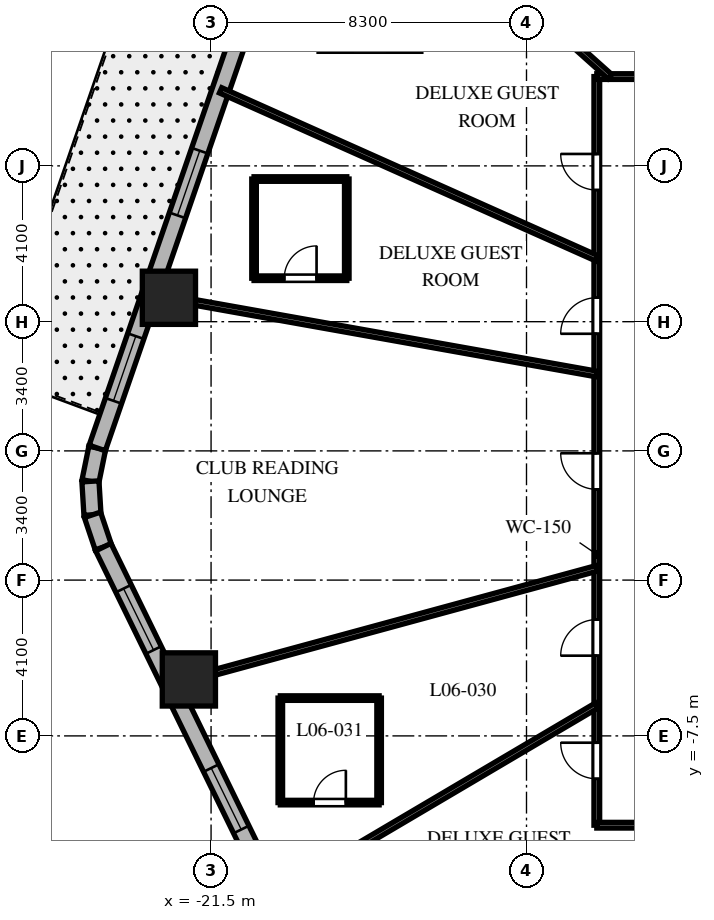
"""IFC4 building model, lengths in metres.
Left out: names, types, materials, properties, quantities, classifications, styles, units other than length and angle.
Written with IfcOpenShell. Run it as: python <this file> out.ifc"""

import sys

from ifc_helpers import new_model, si_unit, direction, frame, frame_2d, origin, origin_2d, place, context, subcontext, project, spatial, rectangle, extrude, element, fill, save


model = new_model("IFC4")
c1 = context("Model", 3, precision=1e-05, world=origin(), true_north=direction((0.0, 1.0)))
c2 = subcontext(c1, "Body", "Model", "MODEL_VIEW")
j1 = project(units=[si_unit("LENGTHUNIT", "METRE"), si_unit("PLANEANGLEUNIT", "RADIAN")], contexts=[c1])
p1 = place(None, origin())
s1 = spatial("IfcSite", under=j1, at=p1, CompositionType="ELEMENT")
p2 = place(p1, origin())
s2 = spatial("IfcBuilding", under=s1, at=p2, CompositionType="ELEMENT")
p3 = place(p2, frame((0.0, 0.0, 34.2)))
s3 = spatial("IfcBuildingStorey", under=s2, at=p3, CompositionType="ELEMENT", Elevation=34.2)
for number, where, z_axis, x_axis in (
    (1, (-22.609, 4.029, 0.0), (0.0, 0.0, 1.0), (1.0, 0.0, 0.0)),
    (2, (-22.084, -6.014, 0.0), (0.0, 0.0, 1.0), (1.0, 0.0, 0.0)),
):
    element("IfcColumn", number, at=place(p3, frame(where, z_axis=z_axis, x_axis=x_axis)), inside=s3, PredefinedType="COLUMN", context=c2, shape_type="SweptSolid", body=[
        extrude(rectangle(XDim=1.4, YDim=1.4, at=origin_2d()), origin(), (0.0, 0.0, 1.0), 3.7),
    ])
p4 = place(p3, frame((-24.496, 0.077, 0.0), z_axis=(0.0, 0.0, 1.0), x_axis=(-0.199570594521, -0.979883451132, 0.0)))
e3 = element("IfcWall", 3, at=p4, inside=s3, PredefinedType="SOLIDWALL", context=c2, shape_type="SweptSolid", body=[
    extrude(rectangle(XDim=0.897, YDim=0.45, at=frame_2d((0.448, 0.0))), origin(), (0.0, 0.0, 1.0), 3.4),
])
p5 = place(p3, frame((-24.675, -0.802, 0.0), z_axis=(0.0, 0.0, 1.0), x_axis=(0.061188874166, -0.998126205286, 0.0)))
e4 = element("IfcWall", 4, at=p5, inside=s3, PredefinedType="SOLIDWALL", context=c2, shape_type="SweptSolid", body=[
    extrude(rectangle(XDim=0.882, YDim=0.45, at=frame_2d((0.441, 0.0))), origin(), (0.0, 0.0, 1.0), 3.4),
])
p6 = place(p3, frame((-24.621, -1.682, 0.0), z_axis=(0.0, 0.0, 1.0), x_axis=(0.317697451681, -0.948192137278, 0.0)))
e5 = element("IfcWall", 5, at=p6, inside=s3, PredefinedType="SOLIDWALL", context=c2, shape_type="SweptSolid", body=[
    extrude(rectangle(XDim=0.897, YDim=0.45, at=frame_2d((0.448, 0.0))), origin(), (0.0, 0.0, 1.0), 3.4),
])
p7 = place(p3, frame((-17.39, 20.678, 0.0), z_axis=(0.0, 0.0, 1.0), x_axis=(-0.326068018294, -0.945346310854, 0.0)))
e6 = element("IfcWall", 6, at=p7, inside=s3, PredefinedType="SOLIDWALL", context=c2, shape_type="SweptSolid", body=[
    extrude(rectangle(XDim=21.793, YDim=0.45, at=frame_2d((10.896, 0.0))), origin(), (0.0, 0.0, 1.0), 3.4),
])
p8 = place(p7, frame((5.493, 0.0, 0.0)))
e7 = element("IfcOpeningElement", 7, at=p8, cuts=e6, PredefinedType="OPENING", context=c2, shape_type="SweptSolid", body=[
    extrude(rectangle(XDim=1.0, YDim=2.15, at=frame_2d((0.5, 1.075))), frame((0.0, 0.235, 0.0), z_axis=(0.0, -1.0, 0.0), x_axis=(1.0, 0.0, 0.0)), (0.0, 0.0, 1.0), 0.47),
])
p9 = place(p7, frame((1.26, 0.0, 0.8)))
e8 = element("IfcOpeningElement", 8, at=p9, cuts=e6, PredefinedType="OPENING", context=c2, shape_type="SweptSolid", body=[
    extrude(rectangle(XDim=1.8, YDim=1.8, at=frame_2d((0.9, 0.9))), frame((0.0, 0.235, 0.0), z_axis=(0.0, -1.0, 0.0), x_axis=(1.0, 0.0, 0.0)), (0.0, 0.0, 1.0), 0.47),
])
p10 = place(p7, frame((7.363, 0.0, 0.8)))
e9 = element("IfcOpeningElement", 9, at=p10, cuts=e6, PredefinedType="OPENING", context=c2, shape_type="SweptSolid", body=[
    extrude(rectangle(XDim=1.8, YDim=1.8, at=frame_2d((0.9, 0.9))), frame((0.0, 0.235, 0.0), z_axis=(0.0, -1.0, 0.0), x_axis=(1.0, 0.0, 0.0)), (0.0, 0.0, 1.0), 0.47),
])
p11 = place(p7, frame((13.518, 0.0, 0.8)))
e10 = element("IfcOpeningElement", 10, at=p11, cuts=e6, PredefinedType="OPENING", context=c2, shape_type="SweptSolid", body=[
    extrude(rectangle(XDim=1.8, YDim=1.8, at=frame_2d((0.9, 0.9))), frame((0.0, 0.235, 0.0), z_axis=(0.0, -1.0, 0.0), x_axis=(1.0, 0.0, 0.0)), (0.0, 0.0, 1.0), 0.47),
])
p12 = place(p7, frame((18.68, 0.0, 0.8)))
e11 = element("IfcOpeningElement", 11, at=p12, cuts=e6, PredefinedType="OPENING", context=c2, shape_type="SweptSolid", body=[
    extrude(rectangle(XDim=1.8, YDim=1.8, at=frame_2d((0.9, 0.9))), frame((0.0, 0.235, 0.0), z_axis=(0.0, -1.0, 0.0), x_axis=(1.0, 0.0, 0.0)), (0.0, 0.0, 1.0), 0.47),
])
p13 = place(p3, frame((-24.336, -2.532, 0.0), z_axis=(0.0, 0.0, 1.0), x_axis=(0.438931326393, -0.898520612291, 0.0)))
e12 = element("IfcWall", 12, at=p13, inside=s3, PredefinedType="SOLIDWALL", context=c2, shape_type="SweptSolid", body=[
    extrude(rectangle(XDim=20.623, YDim=0.45, at=frame_2d((10.312, 0.0))), origin(), (0.0, 0.0, 1.0), 3.4),
])
p14 = place(p13, frame((1.214, 0.0, 0.8)))
e13 = element("IfcOpeningElement", 13, at=p14, cuts=e12, PredefinedType="OPENING", context=c2, shape_type="SweptSolid", body=[
    extrude(rectangle(XDim=1.8, YDim=1.8, at=frame_2d((0.9, 0.9))), frame((0.0, 0.235, 0.0), z_axis=(0.0, -1.0, 0.0), x_axis=(1.0, 0.0, 0.0)), (0.0, 0.0, 1.0), 0.47),
])
p15 = place(p13, frame((6.47, 0.0, 0.8)))
e14 = element("IfcOpeningElement", 14, at=p15, cuts=e12, PredefinedType="OPENING", context=c2, shape_type="SweptSolid", body=[
    extrude(rectangle(XDim=1.8, YDim=1.8, at=frame_2d((0.9, 0.9))), frame((0.0, 0.235, 0.0), z_axis=(0.0, -1.0, 0.0), x_axis=(1.0, 0.0, 0.0)), (0.0, 0.0, 1.0), 0.47),
])
p16 = place(p13, frame((12.311, 0.0, 0.8)))
e15 = element("IfcOpeningElement", 15, at=p16, cuts=e12, PredefinedType="OPENING", context=c2, shape_type="SweptSolid", body=[
    extrude(rectangle(XDim=1.8, YDim=1.8, at=frame_2d((0.9, 0.9))), frame((0.0, 0.235, 0.0), z_axis=(0.0, -1.0, 0.0), x_axis=(1.0, 0.0, 0.0)), (0.0, 0.0, 1.0), 0.47),
])
p17 = place(p13, frame((17.66, 0.0, 0.8)))
e16 = element("IfcOpeningElement", 16, at=p17, cuts=e12, PredefinedType="OPENING", context=c2, shape_type="SweptSolid", body=[
    extrude(rectangle(XDim=1.8, YDim=1.8, at=frame_2d((0.9, 0.9))), frame((0.0, 0.235, 0.0), z_axis=(0.0, -1.0, 0.0), x_axis=(1.0, 0.0, 0.0)), (0.0, 0.0, 1.0), 0.47),
])
p18 = place(p3, frame((-11.35, -9.85, 0.0), z_axis=(0.0, 0.0, 1.0), x_axis=(0.0, 1.0, 0.0)))
e17 = element("IfcWall", 17, at=p18, inside=s3, PredefinedType="PARTITIONING", context=c2, shape_type="SweptSolid", body=[
    extrude(rectangle(XDim=19.7, YDim=0.15, at=frame_2d((9.85, 0.0))), origin(), (0.0, 0.0, 1.0), 2.84),
])
p19 = place(p18, frame((16.714, 0.0, 0.0)))
e18 = element("IfcOpeningElement", 18, at=p19, cuts=e17, PredefinedType="OPENING", context=c2, shape_type="SweptSolid", body=[
    extrude(rectangle(XDim=0.95, YDim=2.03, at=frame_2d((0.475, 1.015))), frame((0.0, 0.085, 0.0), z_axis=(0.0, -1.0, 0.0), x_axis=(1.0, 0.0, 0.0)), (0.0, 0.0, 1.0), 0.17),
])
p20 = place(p18, frame((12.932, 0.0, 0.0)))
e19 = element("IfcOpeningElement", 19, at=p20, cuts=e17, PredefinedType="OPENING", context=c2, shape_type="SweptSolid", body=[
    extrude(rectangle(XDim=0.95, YDim=2.03, at=frame_2d((0.475, 1.015))), frame((0.0, 0.085, 0.0), z_axis=(0.0, -1.0, 0.0), x_axis=(1.0, 0.0, 0.0)), (0.0, 0.0, 1.0), 0.17),
])
p21 = place(p18, frame((8.838, 0.0, 0.0)))
e20 = element("IfcOpeningElement", 20, at=p21, cuts=e17, PredefinedType="OPENING", context=c2, shape_type="SweptSolid", body=[
    extrude(rectangle(XDim=0.95, YDim=2.03, at=frame_2d((0.475, 1.015))), frame((0.0, 0.085, 0.0), z_axis=(0.0, -1.0, 0.0), x_axis=(1.0, 0.0, 0.0)), (0.0, 0.0, 1.0), 0.17),
])
p22 = place(p18, frame((4.461, 0.0, 0.0)))
e21 = element("IfcOpeningElement", 21, at=p22, cuts=e17, PredefinedType="OPENING", context=c2, shape_type="SweptSolid", body=[
    extrude(rectangle(XDim=0.95, YDim=2.03, at=frame_2d((0.475, 1.015))), frame((0.0, 0.085, 0.0), z_axis=(0.0, -1.0, 0.0), x_axis=(1.0, 0.0, 0.0)), (0.0, 0.0, 1.0), 0.17),
])
p23 = place(p18, frame((1.221, 0.0, 0.0)))
e22 = element("IfcOpeningElement", 22, at=p23, cuts=e17, PredefinedType="OPENING", context=c2, shape_type="SweptSolid", body=[
    extrude(rectangle(XDim=0.95, YDim=2.03, at=frame_2d((0.475, 1.015))), frame((0.0, 0.085, 0.0), z_axis=(0.0, -1.0, 0.0), x_axis=(1.0, 0.0, 0.0)), (0.0, 0.0, 1.0), 0.17),
])
p24 = place(p3, frame((-11.35, 9.85, 0.0), z_axis=(0.0, 0.0, 1.0), x_axis=(1.0, 0.0, 0.0)))
e23 = element("IfcWall", 23, at=p24, inside=s3, PredefinedType="PARTITIONING", context=c2, shape_type="SweptSolid", body=[
    extrude(rectangle(XDim=22.7, YDim=0.15, at=frame_2d((11.35, 0.0))), origin(), (0.0, 0.0, 1.0), 2.84),
])
p25 = place(p24, frame((18.436, 0.0, 0.0)))
e24 = element("IfcOpeningElement", 24, at=p25, cuts=e23, PredefinedType="OPENING", context=c2, shape_type="SweptSolid", body=[
    extrude(rectangle(XDim=0.95, YDim=2.03, at=frame_2d((0.475, 1.015))), frame((0.0, 0.085, 0.0), z_axis=(0.0, -1.0, 0.0), x_axis=(1.0, 0.0, 0.0)), (0.0, 0.0, 1.0), 0.17),
])
p26 = place(p24, frame((15.176, 0.0, 0.0)))
e25 = element("IfcOpeningElement", 25, at=p26, cuts=e23, PredefinedType="OPENING", context=c2, shape_type="SweptSolid", body=[
    extrude(rectangle(XDim=0.9, YDim=2.03, at=frame_2d((0.45, 1.015))), frame((0.0, 0.085, 0.0), z_axis=(0.0, -1.0, 0.0), x_axis=(1.0, 0.0, 0.0)), (0.0, 0.0, 1.0), 0.17),
])
p27 = place(p24, frame((12.415, 0.0, 0.0)))
e26 = element("IfcOpeningElement", 26, at=p27, cuts=e23, PredefinedType="OPENING", context=c2, shape_type="SweptSolid", body=[
    extrude(rectangle(XDim=0.95, YDim=2.03, at=frame_2d((0.475, 1.015))), frame((0.0, 0.085, 0.0), z_axis=(0.0, -1.0, 0.0), x_axis=(1.0, 0.0, 0.0)), (0.0, 0.0, 1.0), 0.17),
])
p28 = place(p24, frame((8.925, 0.0, 0.0)))
e27 = element("IfcOpeningElement", 27, at=p28, cuts=e23, PredefinedType="OPENING", context=c2, shape_type="SweptSolid", body=[
    extrude(rectangle(XDim=0.95, YDim=2.03, at=frame_2d((0.475, 1.015))), frame((0.0, 0.085, 0.0), z_axis=(0.0, -1.0, 0.0), x_axis=(1.0, 0.0, 0.0)), (0.0, 0.0, 1.0), 0.17),
])
p29 = place(p24, frame((3.369, 0.0, 0.0)))
e28 = element("IfcOpeningElement", 28, at=p29, cuts=e23, PredefinedType="OPENING", context=c2, shape_type="SweptSolid", body=[
    extrude(rectangle(XDim=0.95, YDim=2.03, at=frame_2d((0.475, 1.015))), frame((0.0, 0.085, 0.0), z_axis=(0.0, -1.0, 0.0), x_axis=(1.0, 0.0, 0.0)), (0.0, 0.0, 1.0), 0.17),
])
p30 = place(p3, frame((11.35, -9.85, 0.0), z_axis=(0.0, 0.0, 1.0), x_axis=(-1.0, 0.0, 0.0)))
e29 = element("IfcWall", 29, at=p30, inside=s3, PredefinedType="PARTITIONING", context=c2, shape_type="SweptSolid", body=[
    extrude(rectangle(XDim=22.7, YDim=0.15, at=frame_2d((11.35, 0.0))), origin(), (0.0, 0.0, 1.0), 2.84),
])
p31 = place(p30, frame((18.436, 0.0, 0.0)))
e30 = element("IfcOpeningElement", 30, at=p31, cuts=e29, PredefinedType="OPENING", context=c2, shape_type="SweptSolid", body=[
    extrude(rectangle(XDim=0.95, YDim=2.03, at=frame_2d((0.475, 1.015))), frame((0.0, 0.085, 0.0), z_axis=(0.0, -1.0, 0.0), x_axis=(1.0, 0.0, 0.0)), (0.0, 0.0, 1.0), 0.17),
])
p32 = place(p30, frame((15.176, 0.0, 0.0)))
e31 = element("IfcOpeningElement", 31, at=p32, cuts=e29, PredefinedType="OPENING", context=c2, shape_type="SweptSolid", body=[
    extrude(rectangle(XDim=0.9, YDim=2.03, at=frame_2d((0.45, 1.015))), frame((0.0, 0.085, 0.0), z_axis=(0.0, -1.0, 0.0), x_axis=(1.0, 0.0, 0.0)), (0.0, 0.0, 1.0), 0.17),
])
p33 = place(p30, frame((12.415, 0.0, 0.0)))
e32 = element("IfcOpeningElement", 32, at=p33, cuts=e29, PredefinedType="OPENING", context=c2, shape_type="SweptSolid", body=[
    extrude(rectangle(XDim=0.95, YDim=2.03, at=frame_2d((0.475, 1.015))), frame((0.0, 0.085, 0.0), z_axis=(0.0, -1.0, 0.0), x_axis=(1.0, 0.0, 0.0)), (0.0, 0.0, 1.0), 0.17),
])
p34 = place(p30, frame((8.925, 0.0, 0.0)))
e33 = element("IfcOpeningElement", 33, at=p34, cuts=e29, PredefinedType="OPENING", context=c2, shape_type="SweptSolid", body=[
    extrude(rectangle(XDim=0.95, YDim=2.03, at=frame_2d((0.475, 1.015))), frame((0.0, 0.085, 0.0), z_axis=(0.0, -1.0, 0.0), x_axis=(1.0, 0.0, 0.0)), (0.0, 0.0, 1.0), 0.17),
])
p35 = place(p30, frame((5.463, 0.0, 0.0)))
e34 = element("IfcOpeningElement", 34, at=p35, cuts=e29, PredefinedType="OPENING", context=c2, shape_type="SweptSolid", body=[
    extrude(rectangle(XDim=0.95, YDim=2.03, at=frame_2d((0.475, 1.015))), frame((0.0, 0.085, 0.0), z_axis=(0.0, -1.0, 0.0), x_axis=(1.0, 0.0, 0.0)), (0.0, 0.0, 1.0), 0.17),
])
p36 = place(p30, frame((1.91, 0.0, 0.0)))
e35 = element("IfcOpeningElement", 35, at=p36, cuts=e29, PredefinedType="OPENING", context=c2, shape_type="SweptSolid", body=[
    extrude(rectangle(XDim=0.9, YDim=2.03, at=frame_2d((0.45, 1.015))), frame((0.0, 0.085, 0.0), z_axis=(0.0, -1.0, 0.0), x_axis=(1.0, 0.0, 0.0)), (0.0, 0.0, 1.0), 0.17),
])
p37 = place(p3, frame((-11.007, 9.85, 0.0), z_axis=(0.0, 0.0, 1.0), x_axis=(-0.745177305978, 0.666866390407, 0.0)))
e36 = element("IfcWall", 36, at=p37, inside=s3, PredefinedType="PARTITIONING", context=c2, shape_type="SweptSolid", body=[
    extrude(rectangle(XDim=10.375, YDim=0.15, at=frame_2d((5.188, 0.0))), origin(), (0.0, 0.0, 1.0), 2.54),
])
p38 = place(p3, frame((-11.35, 5.068, 0.0), z_axis=(0.0, 0.0, 1.0), x_axis=(-0.913107192911, 0.407719577963, 0.0)))
e37 = element("IfcWall", 37, at=p38, inside=s3, PredefinedType="PARTITIONING", context=c2, shape_type="SweptSolid", body=[
    extrude(rectangle(XDim=10.841, YDim=0.15, at=frame_2d((5.421, 0.0))), origin(), (0.0, 0.0, 1.0), 2.54),
])
p39 = place(p3, frame((-11.35, 2.023, 0.0), z_axis=(0.0, 0.0, 1.0), x_axis=(-0.984493741877, 0.17541970301, 0.0)))
e38 = element("IfcWall", 38, at=p39, inside=s3, PredefinedType="PARTITIONING", context=c2, shape_type="SweptSolid", body=[
    extrude(rectangle(XDim=11.937, YDim=0.15, at=frame_2d((5.969, 0.0))), origin(), (0.0, 0.0, 1.0), 2.54),
])
p40 = place(p3, frame((-11.35, -3.091, 0.0), z_axis=(0.0, 0.0, 1.0), x_axis=(-0.964859685283, -0.262765651704, 0.0)))
e39 = element("IfcWall", 39, at=p40, inside=s3, PredefinedType="PARTITIONING", context=c2, shape_type="SweptSolid", body=[
    extrude(rectangle(XDim=11.629, YDim=0.15, at=frame_2d((5.814, 0.0))), origin(), (0.0, 0.0, 1.0), 2.54),
])
p41 = place(p3, frame((-11.35, -6.698, 0.0), z_axis=(0.0, 0.0, 1.0), x_axis=(-0.861198232886, -0.508269223614, 0.0)))
e40 = element("IfcWall", 40, at=p41, inside=s3, PredefinedType="PARTITIONING", context=c2, shape_type="SweptSolid", body=[
    extrude(rectangle(XDim=9.87, YDim=0.15, at=frame_2d((4.935, 0.0))), origin(), (0.0, 0.0, 1.0), 2.54),
])
p42 = place(p3, frame((-9.558, -9.85, 0.0), z_axis=(0.0, 0.0, 1.0), x_axis=(-0.69638346089, -0.717669893056, 0.0)))
e41 = element("IfcWall", 41, at=p42, inside=s3, PredefinedType="PARTITIONING", context=c2, shape_type="SweptSolid", body=[
    extrude(rectangle(XDim=10.701, YDim=0.15, at=frame_2d((5.351, 0.0))), origin(), (0.0, 0.0, 1.0), 2.54),
])
p43 = place(p3, frame((-5.471, -9.85, 0.0), z_axis=(0.0, 0.0, 1.0), x_axis=(-0.48553323157, -0.874218211341, 0.0)))
e42 = element("IfcWall", 42, at=p43, inside=s3, PredefinedType="PARTITIONING", context=c2, shape_type="SweptSolid", body=[
    extrude(rectangle(XDim=14.74, YDim=0.15, at=frame_2d((7.37, 0.0))), origin(), (0.0, 0.0, 1.0), 2.54),
])
p44 = place(p3, frame((-20.369, 4.544, 0.0), z_axis=(0.0, 0.0, 1.0), x_axis=(1.0, 0.0, 0.0)))
e43 = element("IfcWall", 43, at=p44, inside=s3, PredefinedType="PARTITIONING", context=c2, shape_type="SweptSolid", body=[
    extrude(rectangle(XDim=2.44, YDim=0.12, at=frame_2d((1.22, 0.0))), origin(), (0.0, 0.0, 1.0), 2.84),
])
p45 = place(p44, frame((0.795, 0.0, 0.0)))
e44 = element("IfcOpeningElement", 44, at=p45, cuts=e43, PredefinedType="OPENING", context=c2, shape_type="SweptSolid", body=[
    extrude(rectangle(XDim=0.85, YDim=2.03, at=frame_2d((0.425, 1.015))), frame((0.0, 0.07, 0.0), z_axis=(0.0, -1.0, 0.0), x_axis=(1.0, 0.0, 0.0)), (0.0, 0.0, 1.0), 0.14),
])
p46 = place(p3, frame((-17.929, 4.544, 0.0), z_axis=(0.0, 0.0, 1.0), x_axis=(0.0, 1.0, 0.0)))
e45 = element("IfcWall", 45, at=p46, inside=s3, PredefinedType="PARTITIONING", context=c2, shape_type="SweptSolid", body=[
    extrude(rectangle(XDim=2.61, YDim=0.12, at=frame_2d((1.305, 0.0))), origin(), (0.0, 0.0, 1.0), 2.84),
])
p47 = place(p3, frame((-17.929, 7.154, 0.0), z_axis=(0.0, 0.0, 1.0), x_axis=(-1.0, 0.0, 0.0)))
e46 = element("IfcWall", 46, at=p47, inside=s3, PredefinedType="PARTITIONING", context=c2, shape_type="SweptSolid", body=[
    extrude(rectangle(XDim=2.44, YDim=0.12, at=frame_2d((1.22, 0.0))), origin(), (0.0, 0.0, 1.0), 3.4),
])
p48 = place(p3, frame((-20.369, 7.154, 0.0), z_axis=(0.0, 0.0, 1.0), x_axis=(0.0, -1.0, 0.0)))
e47 = element("IfcWall", 47, at=p48, inside=s3, PredefinedType="PARTITIONING", context=c2, shape_type="SweptSolid", body=[
    extrude(rectangle(XDim=2.61, YDim=0.12, at=frame_2d((1.305, 0.0))), origin(), (0.0, 0.0, 1.0), 2.84),
])
p49 = place(p3, frame((-19.678, -9.255, 0.0), z_axis=(0.0, 0.0, 1.0), x_axis=(1.0, 0.0, 0.0)))
e48 = element("IfcWall", 48, at=p49, inside=s3, PredefinedType="PARTITIONING", context=c2, shape_type="SweptSolid", body=[
    extrude(rectangle(XDim=2.6, YDim=0.12, at=frame_2d((1.3, 0.0))), origin(), (0.0, 0.0, 1.0), 3.4),
])
p50 = place(p49, frame((0.875, 0.0, 0.0)))
e49 = element("IfcOpeningElement", 49, at=p50, cuts=e48, PredefinedType="OPENING", context=c2, shape_type="SweptSolid", body=[
    extrude(rectangle(XDim=0.85, YDim=2.03, at=frame_2d((0.425, 1.015))), frame((0.0, 0.07, 0.0), z_axis=(0.0, -1.0, 0.0), x_axis=(1.0, 0.0, 0.0)), (0.0, 0.0, 1.0), 0.14),
])
p51 = place(p3, frame((-17.078, -9.255, 0.0), z_axis=(0.0, 0.0, 1.0), x_axis=(0.0, 1.0, 0.0)))
e50 = element("IfcWall", 50, at=p51, inside=s3, PredefinedType="PARTITIONING", context=c2, shape_type="SweptSolid", body=[
    extrude(rectangle(XDim=2.75, YDim=0.12, at=frame_2d((1.375, 0.0))), origin(), (0.0, 0.0, 1.0), 2.84),
])
p52 = place(p3, frame((-17.078, -6.505, 0.0), z_axis=(0.0, 0.0, 1.0), x_axis=(-1.0, 0.0, 0.0)))
e51 = element("IfcWall", 51, at=p52, inside=s3, PredefinedType="PARTITIONING", context=c2, shape_type="SweptSolid", body=[
    extrude(rectangle(XDim=2.6, YDim=0.12, at=frame_2d((1.3, 0.0))), origin(), (0.0, 0.0, 1.0), 2.84),
])
p53 = place(p3, frame((-19.678, -6.505, 0.0), z_axis=(0.0, 0.0, 1.0), x_axis=(0.0, -1.0, 0.0)))
e52 = element("IfcWall", 52, at=p53, inside=s3, PredefinedType="PARTITIONING", context=c2, shape_type="SweptSolid", body=[
    extrude(rectangle(XDim=2.75, YDim=0.12, at=frame_2d((1.375, 0.0))), origin(), (0.0, 0.0, 1.0), 3.4),
])
p54 = place(p11, origin())
e53 = element("IfcWindow", 53, at=p54, inside=s3, PartitioningType="SINGLE_PANEL", PredefinedType="WINDOW", context=c2, shape_type="SweptSolid", body=[
    extrude(rectangle(XDim=1.8, YDim=1.8, at=frame_2d((0.9, 0.9))), frame((0.0, 0.03, 0.0), z_axis=(0.0, -1.0, 0.0), x_axis=(1.0, 0.0, 0.0)), (0.0, 0.0, 1.0), 0.06),
])
fill(e10, e53)
p55 = place(p12, origin())
e54 = element("IfcWindow", 54, at=p55, inside=s3, PartitioningType="SINGLE_PANEL", PredefinedType="WINDOW", context=c2, shape_type="SweptSolid", body=[
    extrude(rectangle(XDim=1.8, YDim=1.8, at=frame_2d((0.9, 0.9))), frame((0.0, 0.03, 0.0), z_axis=(0.0, -1.0, 0.0), x_axis=(1.0, 0.0, 0.0)), (0.0, 0.0, 1.0), 0.06),
])
fill(e11, e54)
p56 = place(p14, origin())
e55 = element("IfcWindow", 55, at=p56, inside=s3, PartitioningType="SINGLE_PANEL", PredefinedType="WINDOW", context=c2, shape_type="SweptSolid", body=[
    extrude(rectangle(XDim=1.8, YDim=1.8, at=frame_2d((0.9, 0.9))), frame((0.0, 0.03, 0.0), z_axis=(0.0, -1.0, 0.0), x_axis=(1.0, 0.0, 0.0)), (0.0, 0.0, 1.0), 0.06),
])
fill(e13, e55)
p57 = place(p15, origin())
e56 = element("IfcWindow", 56, at=p57, inside=s3, PartitioningType="SINGLE_PANEL", PredefinedType="WINDOW", context=c2, shape_type="SweptSolid", body=[
    extrude(rectangle(XDim=1.8, YDim=1.8, at=frame_2d((0.9, 0.9))), frame((0.0, 0.03, 0.0), z_axis=(0.0, -1.0, 0.0), x_axis=(1.0, 0.0, 0.0)), (0.0, 0.0, 1.0), 0.06),
])
fill(e14, e56)
p58 = place(p19, origin())
e57 = element("IfcDoor", 57, at=p58, inside=s3, OperationType="SINGLE_SWING_RIGHT", PredefinedType="DOOR", context=c2, shape_type="SweptSolid", body=[
    extrude(rectangle(XDim=0.95, YDim=2.03, at=frame_2d((0.475, 1.015))), frame((0.0, 0.025, 0.0), z_axis=(0.0, -1.0, 0.0), x_axis=(1.0, 0.0, 0.0)), (0.0, 0.0, 1.0), 0.05),
])
fill(e18, e57)
p59 = place(p20, origin())
e58 = element("IfcDoor", 58, at=p59, inside=s3, OperationType="SINGLE_SWING_LEFT", PredefinedType="DOOR", context=c2, shape_type="SweptSolid", body=[
    extrude(rectangle(XDim=0.95, YDim=2.03, at=frame_2d((0.475, 1.015))), frame((0.0, 0.025, 0.0), z_axis=(0.0, -1.0, 0.0), x_axis=(1.0, 0.0, 0.0)), (0.0, 0.0, 1.0), 0.05),
])
fill(e19, e58)
p60 = place(p45, origin())
e59 = element("IfcDoor", 59, at=p60, inside=s3, OperationType="SINGLE_SWING_RIGHT", PredefinedType="DOOR", context=c2, shape_type="SweptSolid", body=[
    extrude(rectangle(XDim=0.85, YDim=2.03, at=frame_2d((0.425, 1.015))), frame((0.0, 0.025, 0.0), z_axis=(0.0, -1.0, 0.0), x_axis=(1.0, 0.0, 0.0)), (0.0, 0.0, 1.0), 0.05),
])
fill(e44, e59)
p61 = place(p21, origin())
e60 = element("IfcDoor", 60, at=p61, inside=s3, OperationType="SINGLE_SWING_RIGHT", PredefinedType="DOOR", context=c2, shape_type="SweptSolid", body=[
    extrude(rectangle(XDim=0.95, YDim=2.03, at=frame_2d((0.475, 1.015))), frame((0.0, 0.025, 0.0), z_axis=(0.0, -1.0, 0.0), x_axis=(1.0, 0.0, 0.0)), (0.0, 0.0, 1.0), 0.05),
])
fill(e20, e60)
p62 = place(p22, origin())
e61 = element("IfcDoor", 61, at=p62, inside=s3, OperationType="SINGLE_SWING_LEFT", PredefinedType="DOOR", context=c2, shape_type="SweptSolid", body=[
    extrude(rectangle(XDim=0.95, YDim=2.03, at=frame_2d((0.475, 1.015))), frame((0.0, 0.025, 0.0), z_axis=(0.0, -1.0, 0.0), x_axis=(1.0, 0.0, 0.0)), (0.0, 0.0, 1.0), 0.05),
])
fill(e21, e61)
p63 = place(p50, origin())
e62 = element("IfcDoor", 62, at=p63, inside=s3, OperationType="SINGLE_SWING_RIGHT", PredefinedType="DOOR", context=c2, shape_type="SweptSolid", body=[
    extrude(rectangle(XDim=0.85, YDim=2.03, at=frame_2d((0.425, 1.015))), frame((0.0, 0.025, 0.0), z_axis=(0.0, -1.0, 0.0), x_axis=(1.0, 0.0, 0.0)), (0.0, 0.0, 1.0), 0.05),
])
fill(e49, e62)
p64 = place(p23, origin())
e63 = element("IfcDoor", 63, at=p64, inside=s3, OperationType="SINGLE_SWING_RIGHT", PredefinedType="DOOR", context=c2, shape_type="SweptSolid", body=[
    extrude(rectangle(XDim=0.95, YDim=2.03, at=frame_2d((0.475, 1.015))), frame((0.0, 0.025, 0.0), z_axis=(0.0, -1.0, 0.0), x_axis=(1.0, 0.0, 0.0)), (0.0, 0.0, 1.0), 0.05),
])
fill(e22, e63)
save(model, sys.argv[1])
